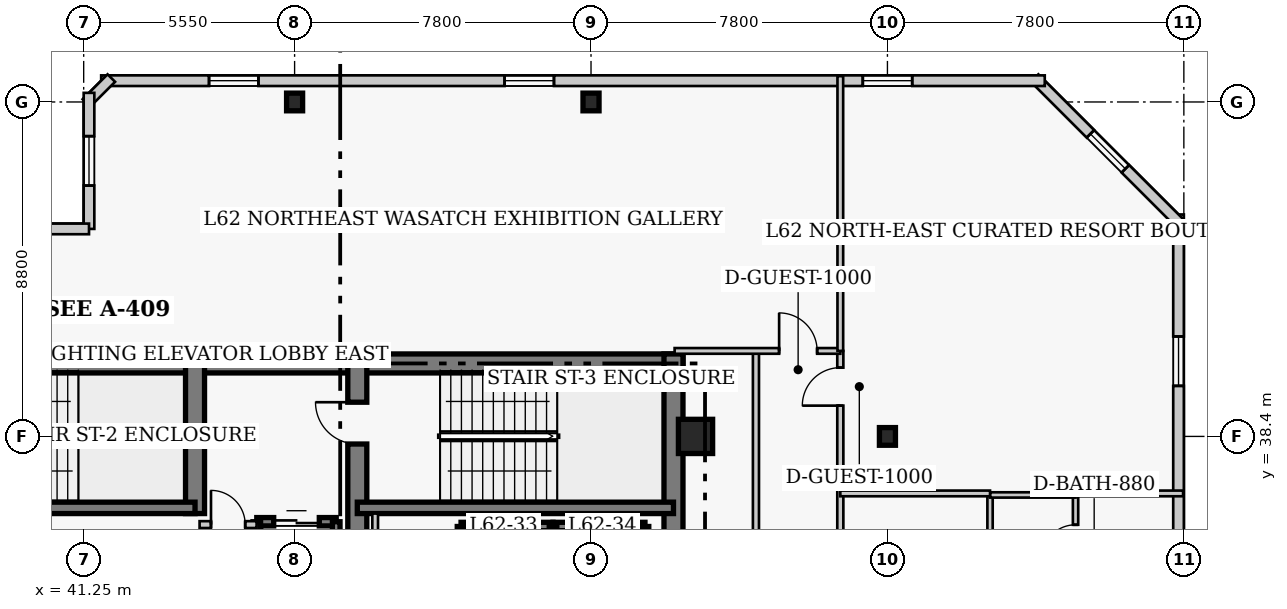
"""IFC4 building model, lengths in metres.
Left out: names, types, materials, properties, quantities, classifications, styles, units other than length and angle.
Written with IfcOpenShell. Run it as: python <this file> out.ifc"""

import sys

from ifc_helpers import new_model, si_unit, direction, frame, frame_2d, origin, origin_2d, place, context, subcontext, project, spatial, rectangle, i_section, extrude, element, fill, save


model = new_model("IFC4")
c1 = context("Model", 3, precision=1e-05, world=origin(), true_north=direction((0.0, 1.0)))
c2 = subcontext(c1, "Body", "Model", "MODEL_VIEW")
j1 = project(units=[si_unit("LENGTHUNIT", "METRE"), si_unit("PLANEANGLEUNIT", "RADIAN")], contexts=[c1])
p1 = place(None, origin())
s1 = spatial("IfcSite", under=j1, at=p1, CompositionType="ELEMENT")
p2 = place(p1, origin())
s2 = spatial("IfcBuilding", under=s1, at=p2, CompositionType="ELEMENT")
p3 = place(p2, frame((0.0, 0.0, 249.4)))
s3 = spatial("IfcBuildingStorey", under=s2, at=p3, CompositionType="ELEMENT", Elevation=249.4)
p4 = place(p3, frame((35.85, 40.32, 0.0), z_axis=(0.0, 0.0, 1.0), x_axis=(1.0, 0.0, 0.0)))
e1 = element("IfcWall", 1, at=p4, inside=s3, PredefinedType="SHEAR", context=c2, shape_type="SweptSolid", body=[
    extrude(rectangle(XDim=12.6, YDim=0.5, at=frame_2d((6.3, 0.0))), origin(), (0.0, 0.0, 1.0), 4.0),
])
p5 = place(p3, frame((48.45, 40.32, 0.0), z_axis=(0.0, 0.0, 1.0), x_axis=(1.0, 0.0, 0.0)))
e2 = element("IfcWall", 2, at=p5, inside=s3, PredefinedType="SHEAR", context=c2, shape_type="SweptSolid", body=[
    extrude(rectangle(XDim=8.57, YDim=0.5, at=frame_2d((4.285, 0.0))), origin(), (0.0, 0.0, 1.0), 4.0),
])
p6 = place(p3, frame((56.77, 27.05, 0.0), z_axis=(0.0, 0.0, 1.0), x_axis=(0.0, 1.0, 0.0)))
e3 = element("IfcWall", 3, at=p6, inside=s3, PredefinedType="SHEAR", context=c2, shape_type="SweptSolid", body=[
    extrude(rectangle(XDim=13.52, YDim=0.5, at=frame_2d((6.76, 0.0))), origin(), (0.0, 0.0, 1.0), 4.0),
])
p7 = place(p3, frame((44.18, 36.37, 0.0), z_axis=(0.0, 0.0, 1.0), x_axis=(0.0, 1.0, 0.0)))
e4 = element("IfcWall", 4, at=p7, inside=s3, PredefinedType="SHEAR", context=c2, shape_type="SweptSolid", body=[
    extrude(rectangle(XDim=3.95, YDim=0.5, at=frame_2d((1.975, 0.0))), origin(), (0.0, 0.0, 1.0), 4.0),
])
p8 = place(p3, frame((48.45, 32.5, 0.0), z_axis=(0.0, 0.0, 1.0), x_axis=(0.0, 1.0, 0.0)))
e5 = element("IfcWall", 5, at=p8, inside=s3, PredefinedType="SHEAR", context=c2, shape_type="SweptSolid", body=[
    extrude(rectangle(XDim=7.82, YDim=0.5, at=frame_2d((3.91, 0.0))), origin(), (0.0, 0.0, 1.0), 4.0),
])
p9 = place(p8, frame((5.7, 0.0, 0.0)))
e6 = element("IfcOpeningElement", 6, at=p9, cuts=e5, PredefinedType="OPENING", context=c2, shape_type="SweptSolid", body=[
    extrude(rectangle(XDim=1.1, YDim=2.15, at=frame_2d((0.55, 1.075))), frame((0.0, 0.26, 0.0), z_axis=(0.0, -1.0, 0.0), x_axis=(1.0, 0.0, 0.0)), (0.0, 0.0, 1.0), 0.52),
])
p10 = place(p3, frame((35.85, 36.52, 0.0), z_axis=(0.0, 0.0, 1.0), x_axis=(1.0, 0.0, 0.0)))
e7 = element("IfcWall", 7, at=p10, inside=s3, PredefinedType="SHEAR", context=c2, shape_type="SweptSolid", body=[
    extrude(rectangle(XDim=8.33, YDim=0.3, at=frame_2d((4.165, 0.0))), origin(), (0.0, 0.0, 1.0), 4.0),
])
p11 = place(p3, frame((48.45, 36.52, 0.0), z_axis=(0.0, 0.0, 1.0), x_axis=(1.0, 0.0, 0.0)))
e8 = element("IfcWall", 8, at=p11, inside=s3, PredefinedType="SHEAR", context=c2, shape_type="SweptSolid", body=[
    extrude(rectangle(XDim=8.32, YDim=0.3, at=frame_2d((4.16, 0.0))), origin(), (0.0, 0.0, 1.0), 4.0),
])
for number, where, z_axis, x_axis in (
    (9, (46.8, 47.2, 0.0), (0.0, 0.0, 1.0), (1.0, 0.0, 0.0)),
    (10, (54.6, 47.2, 0.0), (0.0, 0.0, 1.0), (1.0, 0.0, 0.0)),
    (11, (62.4, 38.4, 0.0), (0.0, 0.0, 1.0), (1.0, 0.0, 0.0)),
):
    element("IfcColumn", number, at=place(p3, frame(where, z_axis=z_axis, x_axis=x_axis)), inside=s3, PredefinedType="COLUMN", context=c2, shape_type="SweptSolid", body=[
        extrude(i_section(OverallWidth=0.422, OverallDepth=0.465, WebThickness=0.045, FlangeThickness=0.073, FilletRadius=0.017, at=origin_2d()), origin(), (0.0, 0.0, 1.0), 4.0),
    ])
p12 = place(p3, frame((57.35, 38.4, 0.0), z_axis=(0.0, 0.0, 1.0), x_axis=(1.0, 0.0, 0.0)))
e12 = element("IfcColumn", 12, at=p12, inside=s3, PredefinedType="COLUMN", context=c2, shape_type="SweptSolid", body=[
    extrude(rectangle(XDim=0.9, YDim=0.9, at=origin_2d()), origin(), (0.0, 0.0, 1.0), 4.0),
])
p13 = place(p3, frame((70.06, 13.36, 0.0), z_axis=(0.0, 0.0, 1.0), x_axis=(0.0, 1.0, 0.0)))
e13 = element("IfcWall", 13, at=p13, inside=s3, PredefinedType="SOLIDWALL", context=c2, shape_type="SweptSolid", body=[
    extrude(rectangle(XDim=30.88, YDim=0.28, at=frame_2d((15.44, 0.0))), origin(), (0.0, 0.0, 1.0), 3.76),
])
p14 = place(p13, frame((3.21, 0.0, 0.85)))
e14 = element("IfcOpeningElement", 14, at=p14, cuts=e13, PredefinedType="OPENING", context=c2, shape_type="SweptSolid", body=[
    extrude(rectangle(XDim=1.3, YDim=1.7, at=frame_2d((0.65, 0.85))), frame((0.0, 0.15, 0.0), z_axis=(0.0, -1.0, 0.0), x_axis=(1.0, 0.0, 0.0)), (0.0, 0.0, 1.0), 0.3),
])
p15 = place(p13, frame((9.78, 0.0, 0.85)))
e15 = element("IfcOpeningElement", 15, at=p15, cuts=e13, PredefinedType="OPENING", context=c2, shape_type="SweptSolid", body=[
    extrude(rectangle(XDim=1.3, YDim=1.7, at=frame_2d((0.65, 0.85))), frame((0.0, 0.15, 0.0), z_axis=(0.0, -1.0, 0.0), x_axis=(1.0, 0.0, 0.0)), (0.0, 0.0, 1.0), 0.3),
])
p16 = place(p13, frame((18.65, 0.0, 0.85)))
e16 = element("IfcOpeningElement", 16, at=p16, cuts=e13, PredefinedType="OPENING", context=c2, shape_type="SweptSolid", body=[
    extrude(rectangle(XDim=1.3, YDim=1.7, at=frame_2d((0.65, 0.85))), frame((0.0, 0.15, 0.0), z_axis=(0.0, -1.0, 0.0), x_axis=(1.0, 0.0, 0.0)), (0.0, 0.0, 1.0), 0.3),
])
p17 = place(p13, frame((26.37, 0.0, 0.85)))
e17 = element("IfcOpeningElement", 17, at=p17, cuts=e13, PredefinedType="OPENING", context=c2, shape_type="SweptSolid", body=[
    extrude(rectangle(XDim=1.3, YDim=1.7, at=frame_2d((0.65, 0.85))), frame((0.0, 0.15, 0.0), z_axis=(0.0, -1.0, 0.0), x_axis=(1.0, 0.0, 0.0)), (0.0, 0.0, 1.0), 0.3),
])
p18 = place(p3, frame((70.129, 43.973, 0.0), z_axis=(0.0, 0.0, 1.0), x_axis=(-0.707106781187, 0.707106781187, 0.0)))
e18 = element("IfcWall", 18, at=p18, inside=s3, PredefinedType="SOLIDWALL", context=c2, shape_type="SweptSolid", body=[
    extrude(rectangle(XDim=5.454, YDim=0.28, at=frame_2d((2.727, 0.0))), origin(), (0.0, 0.0, 1.0), 3.76),
])
p19 = place(p18, frame((2.077, 0.0, 0.85)))
e19 = element("IfcOpeningElement", 19, at=p19, cuts=e18, PredefinedType="OPENING", context=c2, shape_type="SweptSolid", body=[
    extrude(rectangle(XDim=1.3, YDim=1.7, at=frame_2d((0.65, 0.85))), frame((0.0, 0.15, 0.0), z_axis=(0.0, -1.0, 0.0), x_axis=(1.0, 0.0, 0.0)), (0.0, 0.0, 1.0), 0.3),
])
p20 = place(p3, frame((66.54, 47.76, 0.0), z_axis=(0.0, 0.0, 1.0), x_axis=(-1.0, 0.0, 0.0)))
e20 = element("IfcWall", 20, at=p20, inside=s3, PredefinedType="SOLIDWALL", context=c2, shape_type="SweptSolid", body=[
    extrude(rectangle(XDim=24.83, YDim=0.28, at=frame_2d((12.415, 0.0))), origin(), (0.0, 0.0, 1.0), 3.76),
])
p21 = place(p20, frame((3.488, 0.0, 0.85)))
e21 = element("IfcOpeningElement", 21, at=p21, cuts=e20, PredefinedType="OPENING", context=c2, shape_type="SweptSolid", body=[
    extrude(rectangle(XDim=1.3, YDim=1.7, at=frame_2d((0.65, 0.85))), frame((0.0, 0.15, 0.0), z_axis=(0.0, -1.0, 0.0), x_axis=(1.0, 0.0, 0.0)), (0.0, 0.0, 1.0), 0.3),
])
p22 = place(p20, frame((12.915, 0.0, 0.85)))
e22 = element("IfcOpeningElement", 22, at=p22, cuts=e20, PredefinedType="OPENING", context=c2, shape_type="SweptSolid", body=[
    extrude(rectangle(XDim=1.3, YDim=1.7, at=frame_2d((0.65, 0.85))), frame((0.0, 0.15, 0.0), z_axis=(0.0, -1.0, 0.0), x_axis=(1.0, 0.0, 0.0)), (0.0, 0.0, 1.0), 0.3),
])
p23 = place(p20, frame((20.692, 0.0, 0.85)))
e23 = element("IfcOpeningElement", 23, at=p23, cuts=e20, PredefinedType="OPENING", context=c2, shape_type="SweptSolid", body=[
    extrude(rectangle(XDim=1.3, YDim=1.7, at=frame_2d((0.65, 0.85))), frame((0.0, 0.15, 0.0), z_axis=(0.0, -1.0, 0.0), x_axis=(1.0, 0.0, 0.0)), (0.0, 0.0, 1.0), 0.3),
])
p24 = place(p3, frame((41.977, 47.829, 0.0), z_axis=(0.0, 0.0, 1.0), x_axis=(-0.706975312048, -0.707238225886, 0.0)))
e24 = element("IfcWall", 24, at=p24, inside=s3, PredefinedType="SOLIDWALL", context=c2, shape_type="SweptSolid", body=[
    extrude(rectangle(XDim=0.929, YDim=0.28, at=frame_2d((0.464, 0.0))), origin(), (0.0, 0.0, 1.0), 3.76),
])
p25 = place(p3, frame((41.39, 47.44, 0.0), z_axis=(0.0, 0.0, 1.0), x_axis=(0.0, -1.0, 0.0)))
e25 = element("IfcWall", 25, at=p25, inside=s3, PredefinedType="SOLIDWALL", context=c2, shape_type="SweptSolid", body=[
    extrude(rectangle(XDim=3.58, YDim=0.28, at=frame_2d((1.79, 0.0))), origin(), (0.0, 0.0, 1.0), 3.76),
])
p26 = place(p25, frame((1.14, 0.0, 0.85)))
e26 = element("IfcOpeningElement", 26, at=p26, cuts=e25, PredefinedType="OPENING", context=c2, shape_type="SweptSolid", body=[
    extrude(rectangle(XDim=1.3, YDim=1.7, at=frame_2d((0.65, 0.85))), frame((0.0, 0.15, 0.0), z_axis=(0.0, -1.0, 0.0), x_axis=(1.0, 0.0, 0.0)), (0.0, 0.0, 1.0), 0.3),
])
p27 = place(p3, frame((41.39, 43.86, 0.0), z_axis=(0.0, 0.0, 1.0), x_axis=(-1.0, 0.0, 0.0)))
e27 = element("IfcWall", 27, at=p27, inside=s3, PredefinedType="SOLIDWALL", context=c2, shape_type="SweptSolid", body=[
    extrude(rectangle(XDim=4.78, YDim=0.28, at=frame_2d((2.39, 0.0))), origin(), (0.0, 0.0, 1.0), 3.76),
])
p28 = place(p27, frame((1.74, 0.0, 0.85)))
e28 = element("IfcOpeningElement", 28, at=p28, cuts=e27, PredefinedType="OPENING", context=c2, shape_type="SweptSolid", body=[
    extrude(rectangle(XDim=1.3, YDim=1.7, at=frame_2d((0.65, 0.85))), frame((0.0, 0.15, 0.0), z_axis=(0.0, -1.0, 0.0), x_axis=(1.0, 0.0, 0.0)), (0.0, 0.0, 1.0), 0.3),
])
p29 = place(p3, frame((51.18, 36.03, 0.0), z_axis=(0.0, 0.0, 1.0), x_axis=(1.0, 0.0, 0.0)))
e29 = element("IfcWall", 29, at=p29, inside=s3, PredefinedType="SHEAR", context=c2, shape_type="SweptSolid", body=[
    extrude(rectangle(XDim=2.42, YDim=0.22, at=frame_2d((1.21, 0.0))), origin(), (0.0, 0.0, 1.0), 4.0),
])
p30 = place(p3, frame((51.18, 33.17, 0.0), z_axis=(0.0, 0.0, 1.0), x_axis=(0.0, 1.0, 0.0)))
e30 = element("IfcWall", 30, at=p30, inside=s3, PredefinedType="SHEAR", context=c2, shape_type="SweptSolid", body=[
    extrude(rectangle(XDim=2.86, YDim=0.2, at=frame_2d((1.43, 0.0))), origin(), (0.0, 0.0, 1.0), 4.0),
])
p31 = place(p3, frame((53.6, 36.03, 0.0), z_axis=(0.0, 0.0, 1.0), x_axis=(1.0, 0.0, 0.0)))
e31 = element("IfcWall", 31, at=p31, inside=s3, PredefinedType="SHEAR", context=c2, shape_type="SweptSolid", body=[
    extrude(rectangle(XDim=2.42, YDim=0.22, at=frame_2d((1.21, 0.0))), origin(), (0.0, 0.0, 1.0), 4.0),
])
for number, where, z_axis, x_axis in (
    (32, (53.6, 33.17, 0.0), (0.0, 0.0, 1.0), (0.0, 1.0, 0.0)),
    (33, (56.02, 33.17, 0.0), (0.0, 0.0, 1.0), (0.0, 1.0, 0.0)),
):
    element("IfcWall", number, at=place(p3, frame(where, z_axis=z_axis, x_axis=x_axis)), inside=s3, PredefinedType="SHEAR", context=c2, shape_type="SweptSolid", body=[
        extrude(rectangle(XDim=2.86, YDim=0.2, at=frame_2d((1.43, 0.0))), origin(), (0.0, 0.0, 1.0), 4.0),
    ])
p32 = place(p3, frame((45.805, 36.155, 0.0), z_axis=(0.0, 0.0, 1.0), x_axis=(1.0, 0.0, 0.0)))
e34 = element("IfcWall", 34, at=p32, inside=s3, PredefinedType="SHEAR", context=c2, shape_type="SweptSolid", body=[
    extrude(rectangle(XDim=2.09, YDim=0.22, at=frame_2d((1.045, 0.0))), origin(), (0.0, 0.0, 1.0), 4.0),
])
p33 = place(p32, frame((0.445, 0.0, 0.0)))
e35 = element("IfcOpeningElement", 35, at=p33, cuts=e34, PredefinedType="OPENING", context=c2, shape_type="SweptSolid", body=[
    extrude(rectangle(XDim=1.2, YDim=2.15, at=frame_2d((0.6, 1.075))), frame((0.0, 0.12, 0.0), z_axis=(0.0, -1.0, 0.0), x_axis=(1.0, 0.0, 0.0)), (0.0, 0.0, 1.0), 0.24),
])
p34 = place(p3, frame((45.805, 32.65, 0.0), z_axis=(0.0, 0.0, 1.0), x_axis=(0.0, 1.0, 0.0)))
e36 = element("IfcWall", 36, at=p34, inside=s3, PredefinedType="SHEAR", context=c2, shape_type="SweptSolid", body=[
    extrude(rectangle(XDim=3.505, YDim=0.2, at=frame_2d((1.752, 0.0))), origin(), (0.0, 0.0, 1.0), 4.0),
])
p35 = place(p3, frame((47.895, 33.245, 0.0), z_axis=(0.0, 0.0, 1.0), x_axis=(0.0, 1.0, 0.0)))
e37 = element("IfcWall", 37, at=p35, inside=s3, PredefinedType="SHEAR", context=c2, shape_type="SweptSolid", body=[
    extrude(rectangle(XDim=2.91, YDim=0.2, at=frame_2d((1.455, 0.0))), origin(), (0.0, 0.0, 1.0), 4.0),
])
p36 = place(p3, frame((44.3, 36.08, 0.0), z_axis=(0.0, 0.0, 1.0), x_axis=(1.0, 0.0, 0.0)))
e38 = element("IfcWall", 38, at=p36, inside=s3, PredefinedType="PARTITIONING", context=c2, shape_type="SweptSolid", body=[
    extrude(rectangle(XDim=1.5, YDim=0.18, at=frame_2d((0.75, 0.0))), origin(), (0.0, 0.0, 1.0), 3.76),
])
p37 = place(p36, frame((0.3, 0.0, 0.0)))
e39 = element("IfcOpeningElement", 39, at=p37, cuts=e38, PredefinedType="OPENING", context=c2, shape_type="SweptSolid", body=[
    extrude(rectangle(XDim=0.9, YDim=2.15, at=frame_2d((0.45, 1.075))), frame((0.0, 0.1, 0.0), z_axis=(0.0, -1.0, 0.0), x_axis=(1.0, 0.0, 0.0)), (0.0, 0.0, 1.0), 0.2),
])
p38 = place(p3, frame((48.92, 32.75, 0.0), z_axis=(0.0, 0.0, 1.0), x_axis=(0.0, 1.0, 0.0)))
e40 = element("IfcWall", 40, at=p38, inside=s3, PredefinedType="PARTITIONING", context=c2, shape_type="SweptSolid", body=[
    extrude(rectangle(XDim=3.62, YDim=0.15, at=frame_2d((1.81, 0.0))), origin(), (0.0, 0.0, 1.0), 3.76),
])
p39 = place(p3, frame((61.16, 25.1, 0.0), z_axis=(0.0, 0.0, 1.0), x_axis=(0.0, 1.0, 0.0)))
e41 = element("IfcWall", 41, at=p39, inside=s3, PredefinedType="PARTITIONING", context=c2, shape_type="SweptSolid", body=[
    extrude(rectangle(XDim=15.55, YDim=0.16, at=frame_2d((7.775, 0.0))), origin(), (0.0, 0.0, 1.0), 3.76),
])
p40 = place(p39, frame((5.425, 0.0, 0.0)))
e42 = element("IfcOpeningElement", 42, at=p40, cuts=e41, PredefinedType="OPENING", context=c2, shape_type="SweptSolid", body=[
    extrude(rectangle(XDim=0.95, YDim=2.1, at=frame_2d((0.475, 1.05))), frame((0.0, 0.09, 0.0), z_axis=(0.0, -1.0, 0.0), x_axis=(1.0, 0.0, 0.0)), (0.0, 0.0, 1.0), 0.18),
])
p41 = place(p39, frame((14.11, 0.0, 0.0)))
e43 = element("IfcOpeningElement", 43, at=p41, cuts=e41, PredefinedType="OPENING", context=c2, shape_type="SweptSolid", body=[
    extrude(rectangle(XDim=1.0, YDim=2.15, at=frame_2d((0.5, 1.075))), frame((0.0, 0.09, 0.0), z_axis=(0.0, -1.0, 0.0), x_axis=(1.0, 0.0, 0.0)), (0.0, 0.0, 1.0), 0.18),
])
p42 = place(p3, frame((58.94, 27.26, 0.0), z_axis=(0.0, 0.0, 1.0), x_axis=(0.0, 1.0, 0.0)))
e44 = element("IfcWall", 44, at=p42, inside=s3, PredefinedType="PARTITIONING", context=c2, shape_type="SweptSolid", body=[
    extrude(rectangle(XDim=13.39, YDim=0.16, at=frame_2d((6.695, 0.0))), origin(), (0.0, 0.0, 1.0), 3.76),
])
p43 = place(p3, frame((56.8, 40.65, 0.0), z_axis=(0.0, 0.0, 1.0), x_axis=(1.0, 0.0, 0.0)))
e45 = element("IfcWall", 45, at=p43, inside=s3, PredefinedType="PARTITIONING", context=c2, shape_type="SweptSolid", body=[
    extrude(rectangle(XDim=4.36, YDim=0.15, at=frame_2d((2.18, 0.0))), origin(), (0.0, 0.0, 1.0), 3.76),
])
p44 = place(p43, frame((2.75, 0.0, 0.0)))
e46 = element("IfcOpeningElement", 46, at=p44, cuts=e45, PredefinedType="OPENING", context=c2, shape_type="SweptSolid", body=[
    extrude(rectangle(XDim=1.0, YDim=2.15, at=frame_2d((0.5, 1.075))), frame((0.0, 0.085, 0.0), z_axis=(0.0, -1.0, 0.0), x_axis=(1.0, 0.0, 0.0)), (0.0, 0.0, 1.0), 0.17),
])
p45 = place(p3, frame((61.16, 40.65, 0.0), z_axis=(0.0, 0.0, 1.0), x_axis=(0.0, 1.0, 0.0)))
e47 = element("IfcWall", 47, at=p45, inside=s3, PredefinedType="PARTITIONING", context=c2, shape_type="SweptSolid", body=[
    extrude(rectangle(XDim=7.23, YDim=0.15, at=frame_2d((3.615, 0.0))), origin(), (0.0, 0.0, 1.0), 3.76),
])
p46 = place(p3, frame((65.1, 34.41, 0.0), z_axis=(0.0, 0.0, 1.0), x_axis=(0.0, 1.0, 0.0)))
e48 = element("IfcWall", 48, at=p46, inside=s3, PredefinedType="PLUMBINGWALL", context=c2, shape_type="SweptSolid", body=[
    extrude(rectangle(XDim=2.45, YDim=0.14, at=frame_2d((1.225, 0.0))), origin(), (0.0, 0.0, 1.0), 3.76),
])
p47 = place(p3, frame((67.35, 34.41, 0.0), z_axis=(0.0, 0.0, 1.0), x_axis=(0.0, 1.0, 0.0)))
e49 = element("IfcWall", 49, at=p47, inside=s3, PredefinedType="PLUMBINGWALL", context=c2, shape_type="SweptSolid", body=[
    extrude(rectangle(XDim=2.45, YDim=0.14, at=frame_2d((1.225, 0.0))), origin(), (0.0, 0.0, 1.0), 3.76),
])
p48 = place(p47, frame((0.785, 0.0, 0.0)))
e50 = element("IfcOpeningElement", 50, at=p48, cuts=e49, PredefinedType="OPENING", context=c2, shape_type="SweptSolid", body=[
    extrude(rectangle(XDim=0.88, YDim=2.05, at=frame_2d((0.44, 1.025))), frame((0.0, 0.08, 0.0), z_axis=(0.0, -1.0, 0.0), x_axis=(1.0, 0.0, 0.0)), (0.0, 0.0, 1.0), 0.16),
])
p49 = place(p3, frame((65.1, 36.86, 0.0), z_axis=(0.0, 0.0, 1.0), x_axis=(1.0, 0.0, 0.0)))
e51 = element("IfcWall", 51, at=p49, inside=s3, PredefinedType="PLUMBINGWALL", context=c2, shape_type="SweptSolid", body=[
    extrude(rectangle(XDim=2.25, YDim=0.14, at=frame_2d((1.125, 0.0))), origin(), (0.0, 0.0, 1.0), 3.76),
])
p50 = place(p3, frame((61.16, 36.9, 0.0), z_axis=(0.0, 0.0, 1.0), x_axis=(1.0, 0.0, 0.0)))
e52 = element("IfcWall", 52, at=p50, inside=s3, PredefinedType="PARTITIONING", context=c2, shape_type="SweptSolid", body=[
    extrude(rectangle(XDim=3.94, YDim=0.15, at=frame_2d((1.97, 0.0))), origin(), (0.0, 0.0, 1.0), 3.76),
])
p51 = place(p3, frame((67.35, 36.9, 0.0), z_axis=(0.0, 0.0, 1.0), x_axis=(1.0, 0.0, 0.0)))
e53 = element("IfcWall", 53, at=p51, inside=s3, PredefinedType="PARTITIONING", context=c2, shape_type="SweptSolid", body=[
    extrude(rectangle(XDim=2.83, YDim=0.15, at=frame_2d((1.415, 0.0))), origin(), (0.0, 0.0, 1.0), 3.76),
])
p52 = place(p17, origin())
e54 = element("IfcWindow", 54, at=p52, inside=s3, PartitioningType="SINGLE_PANEL", PredefinedType="WINDOW", context=c2, shape_type="SweptSolid", body=[
    extrude(rectangle(XDim=1.3, YDim=1.7, at=frame_2d((0.65, 0.85))), frame((0.0, 0.03, 0.0), z_axis=(0.0, -1.0, 0.0), x_axis=(1.0, 0.0, 0.0)), (0.0, 0.0, 1.0), 0.06),
])
fill(e17, e54)
p53 = place(p19, origin())
e55 = element("IfcWindow", 55, at=p53, inside=s3, PartitioningType="SINGLE_PANEL", PredefinedType="WINDOW", context=c2, shape_type="SweptSolid", body=[
    extrude(rectangle(XDim=1.3, YDim=1.7, at=frame_2d((0.65, 0.85))), frame((0.0, 0.03, 0.0), z_axis=(0.0, -1.0, 0.0), x_axis=(1.0, 0.0, 0.0)), (0.0, 0.0, 1.0), 0.06),
])
fill(e19, e55)
p54 = place(p21, origin())
e56 = element("IfcWindow", 56, at=p54, inside=s3, PartitioningType="SINGLE_PANEL", PredefinedType="WINDOW", context=c2, shape_type="SweptSolid", body=[
    extrude(rectangle(XDim=1.3, YDim=1.7, at=frame_2d((0.65, 0.85))), frame((0.0, 0.03, 0.0), z_axis=(0.0, -1.0, 0.0), x_axis=(1.0, 0.0, 0.0)), (0.0, 0.0, 1.0), 0.06),
])
fill(e21, e56)
p55 = place(p22, origin())
e57 = element("IfcWindow", 57, at=p55, inside=s3, PartitioningType="SINGLE_PANEL", PredefinedType="WINDOW", context=c2, shape_type="SweptSolid", body=[
    extrude(rectangle(XDim=1.3, YDim=1.7, at=frame_2d((0.65, 0.85))), frame((0.0, 0.03, 0.0), z_axis=(0.0, -1.0, 0.0), x_axis=(1.0, 0.0, 0.0)), (0.0, 0.0, 1.0), 0.06),
])
fill(e22, e57)
p56 = place(p23, origin())
e58 = element("IfcWindow", 58, at=p56, inside=s3, PartitioningType="SINGLE_PANEL", PredefinedType="WINDOW", context=c2, shape_type="SweptSolid", body=[
    extrude(rectangle(XDim=1.3, YDim=1.7, at=frame_2d((0.65, 0.85))), frame((0.0, 0.03, 0.0), z_axis=(0.0, -1.0, 0.0), x_axis=(1.0, 0.0, 0.0)), (0.0, 0.0, 1.0), 0.06),
])
fill(e23, e58)
p57 = place(p26, origin())
e59 = element("IfcWindow", 59, at=p57, inside=s3, PartitioningType="SINGLE_PANEL", PredefinedType="WINDOW", context=c2, shape_type="SweptSolid", body=[
    extrude(rectangle(XDim=1.3, YDim=1.7, at=frame_2d((0.65, 0.85))), frame((0.0, 0.03, 0.0), z_axis=(0.0, -1.0, 0.0), x_axis=(1.0, 0.0, 0.0)), (0.0, 0.0, 1.0), 0.06),
])
fill(e26, e59)
p58 = place(p33, origin())
e60 = element("IfcDoor", 60, at=p58, inside=s3, OperationType="DOUBLE_DOOR_SLIDING", PredefinedType="DOOR", context=c2, shape_type="SweptSolid", body=[
    extrude(rectangle(XDim=1.2, YDim=2.15, at=frame_2d((0.6, 1.075))), frame((0.0, 0.025, 0.0), z_axis=(0.0, -1.0, 0.0), x_axis=(1.0, 0.0, 0.0)), (0.0, 0.0, 1.0), 0.05),
])
fill(e35, e60)
p59 = place(p37, origin())
e61 = element("IfcDoor", 61, at=p59, inside=s3, OperationType="SINGLE_SWING_LEFT", PredefinedType="DOOR", context=c2, shape_type="SweptSolid", body=[
    extrude(rectangle(XDim=0.9, YDim=2.15, at=frame_2d((0.45, 1.075))), frame((0.0, 0.025, 0.0), z_axis=(0.0, -1.0, 0.0), x_axis=(1.0, 0.0, 0.0)), (0.0, 0.0, 1.0), 0.05),
])
fill(e39, e61)
p60 = place(p44, origin())
e62 = element("IfcDoor", 62, at=p60, inside=s3, OperationType="SINGLE_SWING_LEFT", PredefinedType="DOOR", context=c2, shape_type="SweptSolid", body=[
    extrude(rectangle(XDim=1.0, YDim=2.15, at=frame_2d((0.5, 1.075))), frame((0.0, 0.025, 0.0), z_axis=(0.0, -1.0, 0.0), x_axis=(1.0, 0.0, 0.0)), (0.0, 0.0, 1.0), 0.05),
])
fill(e46, e62)
p61 = place(p48, origin())
e63 = element("IfcDoor", 63, at=p61, inside=s3, OperationType="SINGLE_SWING_LEFT", PredefinedType="DOOR", context=c2, shape_type="SweptSolid", body=[
    extrude(rectangle(XDim=0.88, YDim=2.05, at=frame_2d((0.44, 1.025))), frame((0.0, 0.025, 0.0), z_axis=(0.0, -1.0, 0.0), x_axis=(1.0, 0.0, 0.0)), (0.0, 0.0, 1.0), 0.05),
])
fill(e50, e63)
p62 = place(p41, origin())
e64 = element("IfcDoor", 64, at=p62, inside=s3, OperationType="SINGLE_SWING_LEFT", PredefinedType="DOOR", context=c2, shape_type="SweptSolid", body=[
    extrude(rectangle(XDim=1.0, YDim=2.15, at=frame_2d((0.5, 1.075))), frame((0.0, 0.025, 0.0), z_axis=(0.0, -1.0, 0.0), x_axis=(1.0, 0.0, 0.0)), (0.0, 0.0, 1.0), 0.05),
])
fill(e43, e64)
p63 = place(p9, origin())
e65 = element("IfcDoor", 65, at=p63, inside=s3, OperationType="SINGLE_SWING_RIGHT", PredefinedType="DOOR", context=c2, shape_type="SweptSolid", body=[
    extrude(rectangle(XDim=1.1, YDim=2.15, at=frame_2d((0.55, 1.075))), frame((0.0, 0.025, 0.0), z_axis=(0.0, -1.0, 0.0), x_axis=(1.0, 0.0, 0.0)), (0.0, 0.0, 1.0), 0.05),
])
fill(e6, e65)
save(model, sys.argv[1])
